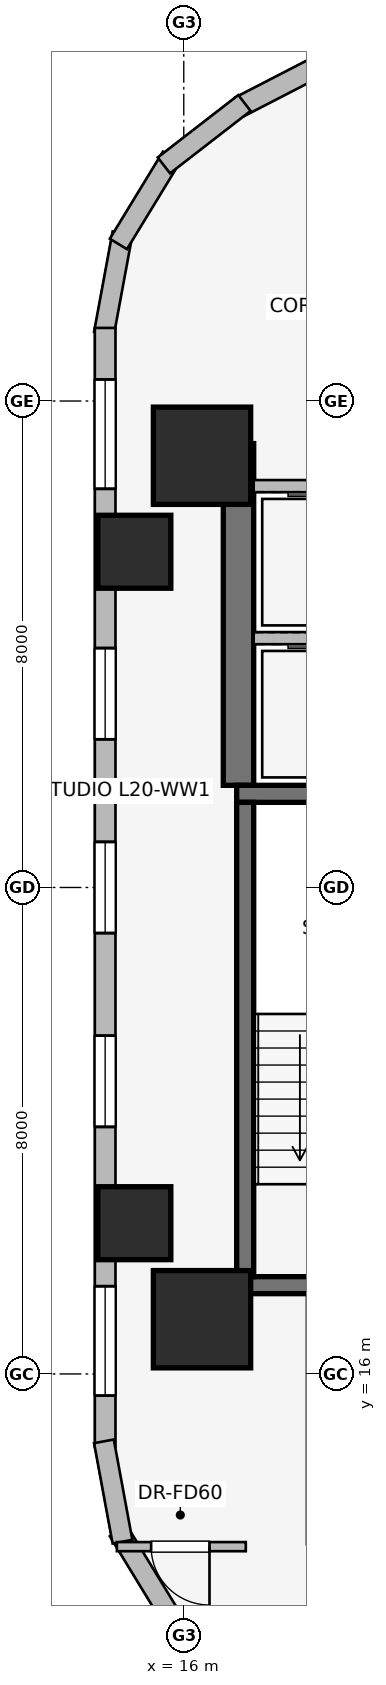
"""IFC4 building model, lengths in metres.
Left out: names, types, materials, properties, quantities, classifications, styles, units other than length and angle.
Written with IfcOpenShell. Run it as: python <this file> out.ifc"""

import sys

from ifc_helpers import new_model, si_unit, direction, frame, frame_2d, origin, origin_2d, place, context, subcontext, project, spatial, rectangle, extrude, element, fill, save


model = new_model("IFC4")
c1 = context("Model", 3, precision=1e-05, world=origin(), true_north=direction((0.0, 1.0)))
c2 = subcontext(c1, "Body", "Model", "MODEL_VIEW")
j1 = project(units=[si_unit("LENGTHUNIT", "METRE"), si_unit("PLANEANGLEUNIT", "RADIAN")], contexts=[c1])
p1 = place(None, origin())
s1 = spatial("IfcSite", under=j1, at=p1, CompositionType="ELEMENT")
p2 = place(p1, origin())
s2 = spatial("IfcBuilding", under=s1, at=p2, CompositionType="ELEMENT")
p3 = place(p2, frame((0.0, 0.0, 78.1)))
s3 = spatial("IfcBuildingStorey", under=s2, at=p3, CompositionType="ELEMENT", Elevation=78.1)
p4 = place(p3, frame((16.9, 25.68, 0.0), z_axis=(0.0, 0.0, 1.0), x_axis=(0.0, 1.0, 0.0)))
e1 = element("IfcWall", 1, at=p4, inside=s3, PredefinedType="SHEAR", context=c2, shape_type="SweptSolid", body=[
    extrude(rectangle(XDim=5.62, YDim=0.5, at=frame_2d((2.81, 0.0))), origin(), (0.0, 0.0, 1.0), 3.65),
])
for number, where, z_axis, x_axis in (
    (2, (16.87, 17.46, 0.0), (0.0, 0.0, 1.0), (1.0, 0.0, 0.0)),
    (3, (20.63, 25.54, 0.0), (0.0, 0.0, 1.0), (-1.0, 0.0, 0.0)),
):
    element("IfcWall", number, at=place(p3, frame(where, z_axis=z_axis, x_axis=x_axis)), inside=s3, PredefinedType="SHEAR", context=c2, shape_type="SweptSolid", body=[
        extrude(rectangle(XDim=3.76, YDim=0.28, at=frame_2d((1.88, 0.0))), origin(), (0.0, 0.0, 1.0), 3.65),
    ])
p5 = place(p3, frame((17.01, 25.4, 0.0), z_axis=(0.0, 0.0, 1.0), x_axis=(0.0, -1.0, 0.0)))
e4 = element("IfcWall", 4, at=p5, inside=s3, PredefinedType="SHEAR", context=c2, shape_type="SweptSolid", body=[
    extrude(rectangle(XDim=7.8, YDim=0.28, at=frame_2d((3.9, 0.0))), origin(), (0.0, 0.0, 1.0), 3.65),
])
for number, where, z_axis, x_axis in (
    (5, (16.3, 16.9, 0.0), (0.0, 0.0, 1.0), (1.0, 0.0, 0.0)),
    (6, (16.3, 31.1, 0.0), (0.0, 0.0, 1.0), (1.0, 0.0, 0.0)),
):
    element("IfcColumn", number, at=place(p3, frame(where, z_axis=z_axis, x_axis=x_axis)), inside=s3, PredefinedType="COLUMN", context=c2, shape_type="SweptSolid", body=[
        extrude(rectangle(XDim=1.6, YDim=1.6, at=origin_2d()), origin(), (0.0, 0.0, 1.0), 3.65),
    ])
for number, where, z_axis, x_axis in (
    (7, (15.187, 29.521, 0.0), (0.0, 0.0, 1.0), (1.0, 0.0, 0.0)),
    (8, (15.187, 18.479, 0.0), (0.0, 0.0, 1.0), (1.0, 0.0, 0.0)),
):
    element("IfcColumn", number, at=place(p3, frame(where, z_axis=z_axis, x_axis=x_axis)), inside=s3, PredefinedType="COLUMN", context=c2, shape_type="SweptSolid", body=[
        extrude(rectangle(XDim=1.2, YDim=1.2, at=origin_2d()), origin(), (0.0, 0.0, 1.0), 3.65),
    ])
p6 = place(p3, frame((16.924, 36.841, 0.0), z_axis=(0.0, 0.0, 1.0), x_axis=(0.888634413993, 0.458616264721, 0.0)))
e9 = element("IfcWall", 9, at=p6, inside=s3, PredefinedType="STANDARD", context=c2, shape_type="SweptSolid", body=[
    extrude(rectangle(XDim=20.531, YDim=0.34, at=frame_2d((10.266, 0.0))), origin(), (0.0, 0.0, 1.0), 2.684),
])
p7 = place(p6, frame((5.197, 0.0, 0.75)))
e10 = element("IfcOpeningElement", 10, at=p7, cuts=e9, PredefinedType="OPENING", context=c2, shape_type="SweptSolid", body=[
    extrude(rectangle(XDim=1.8, YDim=1.5, at=frame_2d((0.9, 0.75))), frame((0.0, 0.18, 0.0), z_axis=(0.0, -1.0, 0.0), x_axis=(1.0, 0.0, 0.0)), (0.0, 0.0, 1.0), 0.36),
])
p8 = place(p6, frame((7.698, 0.0, 0.75)))
e11 = element("IfcOpeningElement", 11, at=p8, cuts=e9, PredefinedType="OPENING", context=c2, shape_type="SweptSolid", body=[
    extrude(rectangle(XDim=1.8, YDim=1.5, at=frame_2d((0.9, 0.75))), frame((0.0, 0.18, 0.0), z_axis=(0.0, -1.0, 0.0), x_axis=(1.0, 0.0, 0.0)), (0.0, 0.0, 1.0), 0.36),
])
p9 = place(p6, frame((11.101, 0.0, 0.75)))
e12 = element("IfcOpeningElement", 12, at=p9, cuts=e9, PredefinedType="OPENING", context=c2, shape_type="SweptSolid", body=[
    extrude(rectangle(XDim=1.5, YDim=1.5, at=frame_2d((0.75, 0.75))), frame((0.0, 0.18, 0.0), z_axis=(0.0, -1.0, 0.0), x_axis=(1.0, 0.0, 0.0)), (0.0, 0.0, 1.0), 0.36),
])
p10 = place(p6, frame((13.657, 0.0, 0.75)))
e13 = element("IfcOpeningElement", 13, at=p10, cuts=e9, PredefinedType="OPENING", context=c2, shape_type="SweptSolid", body=[
    extrude(rectangle(XDim=1.5, YDim=1.5, at=frame_2d((0.75, 0.75))), frame((0.0, 0.18, 0.0), z_axis=(0.0, -1.0, 0.0), x_axis=(1.0, 0.0, 0.0)), (0.0, 0.0, 1.0), 0.36),
])
p11 = place(p6, frame((17.476, 0.0, 0.75)))
e14 = element("IfcOpeningElement", 14, at=p11, cuts=e9, PredefinedType="OPENING", context=c2, shape_type="SweptSolid", body=[
    extrude(rectangle(XDim=1.05, YDim=1.4, at=frame_2d((0.525, 0.7))), frame((0.0, 0.18, 0.0), z_axis=(0.0, -1.0, 0.0), x_axis=(1.0, 0.0, 0.0)), (0.0, 0.0, 1.0), 0.36),
])
p12 = place(p3, frame((14.687, 33.108, 0.0), z_axis=(0.0, 0.0, 1.0), x_axis=(0.181714143354, 0.983351397063, 0.0)))
e15 = element("IfcWall", 15, at=p12, inside=s3, PredefinedType="STANDARD", context=c2, shape_type="SweptSolid", body=[
    extrude(rectangle(XDim=1.678, YDim=0.33, at=frame_2d((0.839, 0.0))), origin(), (0.0, 0.0, 1.0), 3.39),
])
p13 = place(p3, frame((14.925, 34.583, 0.0), z_axis=(0.0, 0.0, 1.0), x_axis=(0.520584129191, 0.853810379671, 0.0)))
e16 = element("IfcWall", 16, at=p13, inside=s3, PredefinedType="STANDARD", context=c2, shape_type="SweptSolid", body=[
    extrude(rectangle(XDim=1.677, YDim=0.33, at=frame_2d((0.838, 0.0))), origin(), (0.0, 0.0, 1.0), 3.39),
])
p14 = place(p3, frame((15.673, 35.875, 0.0), z_axis=(0.0, 0.0, 1.0), x_axis=(0.790691856293, 0.61221433207, 0.0)))
e17 = element("IfcWall", 17, at=p14, inside=s3, PredefinedType="STANDARD", context=c2, shape_type="SweptSolid", body=[
    extrude(rectangle(XDim=1.676, YDim=0.33, at=frame_2d((0.838, 0.0))), origin(), (0.0, 0.0, 1.0), 3.39),
])
p15 = place(p3, frame((14.707, 14.798, 0.0), z_axis=(0.0, 0.0, 1.0), x_axis=(0.0, 1.0, 0.0)))
e18 = element("IfcWall", 18, at=p15, inside=s3, PredefinedType="STANDARD", context=c2, shape_type="SweptSolid", body=[
    extrude(rectangle(XDim=18.404, YDim=0.34, at=frame_2d((9.202, 0.0))), origin(), (0.0, 0.0, 1.0), 2.684),
])
p16 = place(p15, frame((0.845, 0.0, 0.75)))
e19 = element("IfcOpeningElement", 19, at=p16, cuts=e18, PredefinedType="OPENING", context=c2, shape_type="SweptSolid", body=[
    extrude(rectangle(XDim=1.8, YDim=1.5, at=frame_2d((0.9, 0.75))), frame((0.0, 0.18, 0.0), z_axis=(0.0, -1.0, 0.0), x_axis=(1.0, 0.0, 0.0)), (0.0, 0.0, 1.0), 0.36),
])
p17 = place(p15, frame((5.265, 0.0, 0.75)))
e20 = element("IfcOpeningElement", 20, at=p17, cuts=e18, PredefinedType="OPENING", context=c2, shape_type="SweptSolid", body=[
    extrude(rectangle(XDim=1.5, YDim=1.5, at=frame_2d((0.75, 0.75))), frame((0.0, 0.18, 0.0), z_axis=(0.0, -1.0, 0.0), x_axis=(1.0, 0.0, 0.0)), (0.0, 0.0, 1.0), 0.36),
])
p18 = place(p15, frame((8.452, 0.0, 0.75)))
e21 = element("IfcOpeningElement", 21, at=p18, cuts=e18, PredefinedType="OPENING", context=c2, shape_type="SweptSolid", body=[
    extrude(rectangle(XDim=1.5, YDim=1.5, at=frame_2d((0.75, 0.75))), frame((0.0, 0.18, 0.0), z_axis=(0.0, -1.0, 0.0), x_axis=(1.0, 0.0, 0.0)), (0.0, 0.0, 1.0), 0.36),
])
p19 = place(p15, frame((11.639, 0.0, 0.75)))
e22 = element("IfcOpeningElement", 22, at=p19, cuts=e18, PredefinedType="OPENING", context=c2, shape_type="SweptSolid", body=[
    extrude(rectangle(XDim=1.5, YDim=1.5, at=frame_2d((0.75, 0.75))), frame((0.0, 0.18, 0.0), z_axis=(0.0, -1.0, 0.0), x_axis=(1.0, 0.0, 0.0)), (0.0, 0.0, 1.0), 0.36),
])
p20 = place(p15, frame((15.758, 0.0, 0.75)))
e23 = element("IfcOpeningElement", 23, at=p20, cuts=e18, PredefinedType="OPENING", context=c2, shape_type="SweptSolid", body=[
    extrude(rectangle(XDim=1.8, YDim=1.5, at=frame_2d((0.9, 0.75))), frame((0.0, 0.18, 0.0), z_axis=(0.0, -1.0, 0.0), x_axis=(1.0, 0.0, 0.0)), (0.0, 0.0, 1.0), 0.36),
])
p21 = place(p3, frame((16.998, 11.099, 0.0), z_axis=(0.0, 0.0, 1.0), x_axis=(-0.790691856293, 0.61221433207, 0.0)))
e24 = element("IfcWall", 24, at=p21, inside=s3, PredefinedType="STANDARD", context=c2, shape_type="SweptSolid", body=[
    extrude(rectangle(XDim=1.676, YDim=0.33, at=frame_2d((0.838, 0.0))), origin(), (0.0, 0.0, 1.0), 3.39),
])
p22 = place(p3, frame((15.798, 11.985, 0.0), z_axis=(0.0, 0.0, 1.0), x_axis=(-0.520584129191, 0.853810379671, 0.0)))
e25 = element("IfcWall", 25, at=p22, inside=s3, PredefinedType="STANDARD", context=c2, shape_type="SweptSolid", body=[
    extrude(rectangle(XDim=1.677, YDim=0.33, at=frame_2d((0.838, 0.0))), origin(), (0.0, 0.0, 1.0), 3.39),
])
p23 = place(p3, frame((14.992, 13.242, 0.0), z_axis=(0.0, 0.0, 1.0), x_axis=(-0.181714143354, 0.983351397063, 0.0)))
e26 = element("IfcWall", 26, at=p23, inside=s3, PredefinedType="STANDARD", context=c2, shape_type="SweptSolid", body=[
    extrude(rectangle(XDim=1.678, YDim=0.33, at=frame_2d((0.839, 0.0))), origin(), (0.0, 0.0, 1.0), 3.39),
])
p24 = place(p3, frame((17.15, 28.1, 0.0), z_axis=(0.0, 0.0, 1.0), x_axis=(1.0, 0.0, 0.0)))
e27 = element("IfcWall", 27, at=p24, inside=s3, PredefinedType="PARTITIONING", context=c2, shape_type="SweptSolid", body=[
    extrude(rectangle(XDim=2.5, YDim=0.2, at=frame_2d((1.25, 0.0))), origin(), (0.0, 0.0, 1.0), 3.39),
])
p25 = place(p3, frame((19.65, 30.6, 0.0), z_axis=(0.0, 0.0, 1.0), x_axis=(-1.0, 0.0, 0.0)))
e28 = element("IfcWall", 28, at=p25, inside=s3, PredefinedType="PARTITIONING", context=c2, shape_type="SweptSolid", body=[
    extrude(rectangle(XDim=2.5, YDim=0.2, at=frame_2d((1.25, 0.0))), origin(), (0.0, 0.0, 1.0), 2.29),
])
p26 = place(p3, frame((17.02, 13.16, 0.0), z_axis=(0.0, 0.0, 1.0), x_axis=(-1.0, 0.0, 0.0)))
e29 = element("IfcWall", 29, at=p26, inside=s3, PredefinedType="PARTITIONING", context=c2, shape_type="SweptSolid", body=[
    extrude(rectangle(XDim=2.12, YDim=0.15, at=frame_2d((1.06, 0.0))), origin(), (0.0, 0.0, 1.0), 3.39),
])
p27 = place(p26, frame((0.597, 0.0, 0.0)))
e30 = element("IfcOpeningElement", 30, at=p27, cuts=e29, PredefinedType="OPENING", context=c2, shape_type="SweptSolid", body=[
    extrude(rectangle(XDim=0.96, YDim=2.0, at=frame_2d((0.48, 1.0))), frame((0.0, 0.085, 0.0), z_axis=(0.0, -1.0, 0.0), x_axis=(1.0, 0.0, 0.0)), (0.0, 0.0, 1.0), 0.17),
])
p28 = place(p16, origin())
e31 = element("IfcWindow", 31, at=p28, inside=s3, PartitioningType="SINGLE_PANEL", PredefinedType="WINDOW", context=c2, shape_type="SweptSolid", body=[
    extrude(rectangle(XDim=1.8, YDim=1.5, at=frame_2d((0.9, 0.75))), frame((0.0, 0.03, 0.0), z_axis=(0.0, -1.0, 0.0), x_axis=(1.0, 0.0, 0.0)), (0.0, 0.0, 1.0), 0.06),
])
fill(e19, e31)
p29 = place(p17, origin())
e32 = element("IfcWindow", 32, at=p29, inside=s3, PartitioningType="SINGLE_PANEL", PredefinedType="WINDOW", context=c2, shape_type="SweptSolid", body=[
    extrude(rectangle(XDim=1.5, YDim=1.5, at=frame_2d((0.75, 0.75))), frame((0.0, 0.03, 0.0), z_axis=(0.0, -1.0, 0.0), x_axis=(1.0, 0.0, 0.0)), (0.0, 0.0, 1.0), 0.06),
])
fill(e20, e32)
p30 = place(p18, origin())
e33 = element("IfcWindow", 33, at=p30, inside=s3, PartitioningType="SINGLE_PANEL", PredefinedType="WINDOW", context=c2, shape_type="SweptSolid", body=[
    extrude(rectangle(XDim=1.5, YDim=1.5, at=frame_2d((0.75, 0.75))), frame((0.0, 0.03, 0.0), z_axis=(0.0, -1.0, 0.0), x_axis=(1.0, 0.0, 0.0)), (0.0, 0.0, 1.0), 0.06),
])
fill(e21, e33)
p31 = place(p19, origin())
e34 = element("IfcWindow", 34, at=p31, inside=s3, PartitioningType="SINGLE_PANEL", PredefinedType="WINDOW", context=c2, shape_type="SweptSolid", body=[
    extrude(rectangle(XDim=1.5, YDim=1.5, at=frame_2d((0.75, 0.75))), frame((0.0, 0.03, 0.0), z_axis=(0.0, -1.0, 0.0), x_axis=(1.0, 0.0, 0.0)), (0.0, 0.0, 1.0), 0.06),
])
fill(e22, e34)
p32 = place(p20, origin())
e35 = element("IfcWindow", 35, at=p32, inside=s3, PartitioningType="SINGLE_PANEL", PredefinedType="WINDOW", context=c2, shape_type="SweptSolid", body=[
    extrude(rectangle(XDim=1.8, YDim=1.5, at=frame_2d((0.9, 0.75))), frame((0.0, 0.03, 0.0), z_axis=(0.0, -1.0, 0.0), x_axis=(1.0, 0.0, 0.0)), (0.0, 0.0, 1.0), 0.06),
])
fill(e23, e35)
p33 = place(p27, origin())
e36 = element("IfcDoor", 36, at=p33, inside=s3, OperationType="SINGLE_SWING_LEFT", PredefinedType="DOOR", context=c2, shape_type="SweptSolid", body=[
    extrude(rectangle(XDim=0.96, YDim=2.0, at=frame_2d((0.48, 1.0))), frame((0.0, 0.025, 0.0), z_axis=(0.0, -1.0, 0.0), x_axis=(1.0, 0.0, 0.0)), (0.0, 0.0, 1.0), 0.05),
])
fill(e30, e36)
save(model, sys.argv[1])
